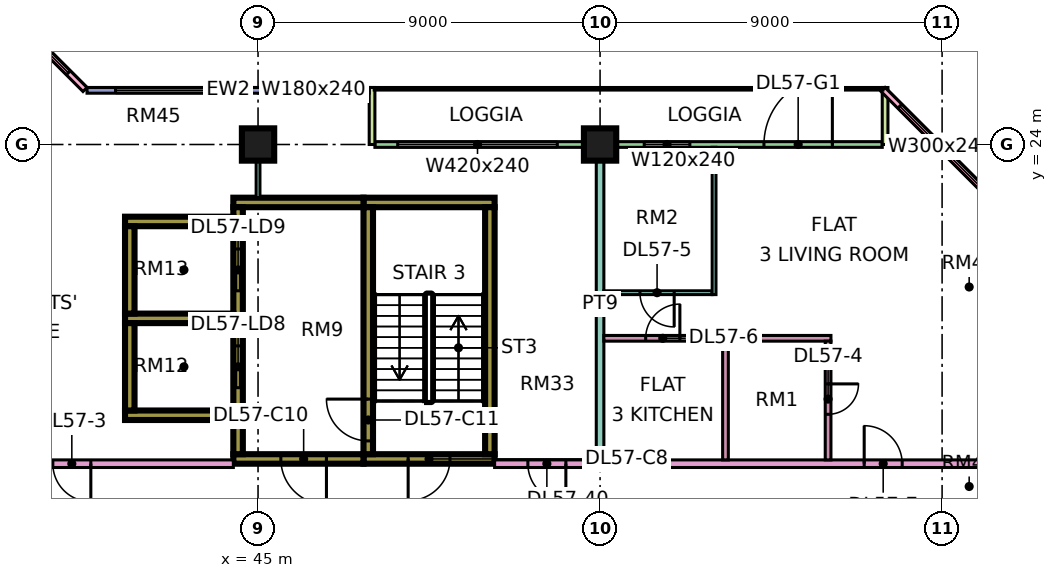
"""IFC4 building model, lengths in metres.
Left out: names, types, materials, properties, quantities, classifications, styles, units other than length and angle.
Written with IfcOpenShell. Run it as: python <this file> out.ifc"""

import sys

from ifc_helpers import new_model, si_unit, direction, frame, frame_2d, origin, origin_2d, place, context, subcontext, project, spatial, rectangle, extrude, element, fill, save


model = new_model("IFC4")
c1 = context("Model", 3, precision=1e-05, world=origin(), true_north=direction((0.0, 1.0)))
c2 = subcontext(c1, "Body", "Model", "MODEL_VIEW")
j1 = project(units=[si_unit("LENGTHUNIT", "METRE"), si_unit("PLANEANGLEUNIT", "RADIAN")], contexts=[c1])
p1 = place(None, origin())
s1 = spatial("IfcSite", under=j1, at=p1, CompositionType="ELEMENT")
p2 = place(p1, origin())
s2 = spatial("IfcBuilding", under=s1, at=p2, CompositionType="ELEMENT")
p3 = place(p2, frame((0.0, 0.0, 241.65)))
s3 = spatial("IfcBuildingStorey", under=s2, at=p3, CompositionType="ELEMENT", Elevation=241.65)
for number, where, z_axis, x_axis in (
    (1, (45.0, 24.0, 0.0), (0.0, 0.0, 1.0), (1.0, 0.0, 0.0)),
    (2, (54.0, 24.0, 0.0), (0.0, 0.0, 1.0), (1.0, 0.0, 0.0)),
):
    element("IfcColumn", number, at=place(p3, frame(where, z_axis=z_axis, x_axis=x_axis)), inside=s3, PredefinedType="COLUMN", context=c2, shape_type="SweptSolid", body=[
        extrude(rectangle(XDim=0.85, YDim=0.85, at=origin_2d()), origin(), (0.0, 0.0, 1.0), 3.75),
    ])
p4 = place(p3, frame((47.775, 15.725, 0.0), z_axis=(0.0, 0.0, 1.0), x_axis=(1.0, 0.0, 0.0)))
e3 = element("IfcWall", 3, at=p4, inside=s3, PredefinedType="SHEAR", context=c2, shape_type="SweptSolid", body=[
    extrude(rectangle(XDim=3.45, YDim=0.25, at=frame_2d((1.725, 0.0))), origin(), (0.0, 0.0, 1.0), 3.75),
])
p5 = place(p4, frame((1.175, 0.0, 0.0)))
e4 = element("IfcOpeningElement", 4, at=p5, cuts=e3, PredefinedType="OPENING", context=c2, shape_type="SweptSolid", body=[
    extrude(rectangle(XDim=1.1, YDim=2.2, at=frame_2d((0.55, 1.1))), frame((0.0, 0.135, 0.0), z_axis=(0.0, -1.0, 0.0), x_axis=(1.0, 0.0, 0.0)), (0.0, 0.0, 1.0), 0.27),
])
p6 = place(p3, frame((47.775, 22.475, 0.0), z_axis=(0.0, 0.0, 1.0), x_axis=(1.0, 0.0, 0.0)))
e5 = element("IfcWall", 5, at=p6, inside=s3, PredefinedType="SHEAR", context=c2, shape_type="SweptSolid", body=[
    extrude(rectangle(XDim=3.45, YDim=0.25, at=frame_2d((1.725, 0.0))), origin(), (0.0, 0.0, 1.0), 3.75),
])
p7 = place(p3, frame((47.9, 15.85, 0.0), z_axis=(0.0, 0.0, 1.0), x_axis=(0.0, 1.0, 0.0)))
e6 = element("IfcWall", 6, at=p7, inside=s3, PredefinedType="SHEAR", context=c2, shape_type="SweptSolid", body=[
    extrude(rectangle(XDim=6.5, YDim=0.25, at=frame_2d((3.25, 0.0))), origin(), (0.0, 0.0, 1.0), 3.75),
])
p8 = place(p7, frame((0.35, 0.0, 0.0)))
e7 = element("IfcOpeningElement", 7, at=p8, cuts=e6, PredefinedType="OPENING", context=c2, shape_type="SweptSolid", body=[
    extrude(rectangle(XDim=1.1, YDim=2.2, at=frame_2d((0.55, 1.1))), frame((0.0, 0.135, 0.0), z_axis=(0.0, -1.0, 0.0), x_axis=(1.0, 0.0, 0.0)), (0.0, 0.0, 1.0), 0.27),
])
p9 = place(p3, frame((51.1, 15.85, 0.0), z_axis=(0.0, 0.0, 1.0), x_axis=(0.0, 1.0, 0.0)))
e8 = element("IfcWall", 8, at=p9, inside=s3, PredefinedType="SHEAR", context=c2, shape_type="SweptSolid", body=[
    extrude(rectangle(XDim=6.5, YDim=0.25, at=frame_2d((3.25, 0.0))), origin(), (0.0, 0.0, 1.0), 3.75),
])
p10 = place(p3, frame((44.35, 15.725, 0.0), z_axis=(0.0, 0.0, 1.0), x_axis=(1.0, 0.0, 0.0)))
e9 = element("IfcWall", 9, at=p10, inside=s3, PredefinedType="SHEAR", context=c2, shape_type="SweptSolid", body=[
    extrude(rectangle(XDim=3.425, YDim=0.25, at=frame_2d((1.712, 0.0))), origin(), (0.0, 0.0, 1.0), 3.75),
])
p11 = place(p10, frame((1.25, 0.0, 0.0)))
e10 = element("IfcOpeningElement", 10, at=p11, cuts=e9, PredefinedType="OPENING", context=c2, shape_type="SweptSolid", body=[
    extrude(rectangle(XDim=1.2, YDim=2.2, at=frame_2d((0.6, 1.1))), frame((0.0, 0.135, 0.0), z_axis=(0.0, -1.0, 0.0), x_axis=(1.0, 0.0, 0.0)), (0.0, 0.0, 1.0), 0.27),
])
p12 = place(p3, frame((44.35, 22.475, 0.0), z_axis=(0.0, 0.0, 1.0), x_axis=(1.0, 0.0, 0.0)))
e11 = element("IfcWall", 11, at=p12, inside=s3, PredefinedType="SHEAR", context=c2, shape_type="SweptSolid", body=[
    extrude(rectangle(XDim=3.425, YDim=0.25, at=frame_2d((1.712, 0.0))), origin(), (0.0, 0.0, 1.0), 3.75),
])
p13 = place(p3, frame((44.475, 15.85, 0.0), z_axis=(0.0, 0.0, 1.0), x_axis=(0.0, 1.0, 0.0)))
e12 = element("IfcWall", 12, at=p13, inside=s3, PredefinedType="SHEAR", context=c2, shape_type="SweptSolid", body=[
    extrude(rectangle(XDim=6.5, YDim=0.25, at=frame_2d((3.25, 0.0))), origin(), (0.0, 0.0, 1.0), 3.75),
])
p14 = place(p13, frame((1.75, 0.0, 0.0)))
e13 = element("IfcOpeningElement", 13, at=p14, cuts=e12, PredefinedType="OPENING", context=c2, shape_type="SweptSolid", body=[
    extrude(rectangle(XDim=1.1, YDim=2.2, at=frame_2d((0.55, 1.1))), frame((0.0, 0.135, 0.0), z_axis=(0.0, -1.0, 0.0), x_axis=(1.0, 0.0, 0.0)), (0.0, 0.0, 1.0), 0.27),
])
p15 = place(p13, frame((4.3, 0.0, 0.0)))
e14 = element("IfcOpeningElement", 14, at=p15, cuts=e12, PredefinedType="OPENING", context=c2, shape_type="SweptSolid", body=[
    extrude(rectangle(XDim=1.1, YDim=2.2, at=frame_2d((0.55, 1.1))), frame((0.0, 0.135, 0.0), z_axis=(0.0, -1.0, 0.0), x_axis=(1.0, 0.0, 0.0)), (0.0, 0.0, 1.0), 0.27),
])
for number, where, z_axis, x_axis in (
    (15, (41.5, 16.875, 0.0), (0.0, 0.0, 1.0), (1.0, 0.0, 0.0)),
    (16, (41.5, 19.425, 0.0), (0.0, 0.0, 1.0), (1.0, 0.0, 0.0)),
    (17, (41.5, 21.975, 0.0), (0.0, 0.0, 1.0), (1.0, 0.0, 0.0)),
):
    element("IfcWall", number, at=place(p3, frame(where, z_axis=z_axis, x_axis=x_axis)), inside=s3, PredefinedType="SHEAR", context=c2, shape_type="SweptSolid", body=[
        extrude(rectangle(XDim=2.85, YDim=0.25, at=frame_2d((1.425, 0.0))), origin(), (0.0, 0.0, 1.0), 3.75),
    ])
for number, where, z_axis, x_axis in (
    (18, (41.625, 17.0, 0.0), (0.0, 0.0, 1.0), (0.0, 1.0, 0.0)),
    (19, (41.625, 19.55, 0.0), (0.0, 0.0, 1.0), (0.0, 1.0, 0.0)),
):
    element("IfcWall", number, at=place(p3, frame(where, z_axis=z_axis, x_axis=x_axis)), inside=s3, PredefinedType="SHEAR", context=c2, shape_type="SweptSolid", body=[
        extrude(rectangle(XDim=2.3, YDim=0.25, at=frame_2d((1.15, 0.0))), origin(), (0.0, 0.0, 1.0), 3.75),
    ])
p16 = place(p3, frame((61.425, 24.0, 0.0), z_axis=(0.0, 0.0, 1.0), x_axis=(-1.0, 0.0, 0.0)))
e20 = element("IfcWall", 20, at=p16, inside=s3, PredefinedType="SOLIDWALL", context=c2, shape_type="SweptSolid", body=[
    extrude(rectangle(XDim=13.35, YDim=0.15, at=frame_2d((6.675, 0.0))), origin(), (0.0, 0.0, 1.0), 3.35),
])
p17 = place(p16, frame((1.312, 0.0, 0.0)))
e21 = element("IfcOpeningElement", 21, at=p17, cuts=e20, PredefinedType="OPENING", context=c2, shape_type="SweptSolid", body=[
    extrude(rectangle(XDim=1.8, YDim=2.4, at=frame_2d((0.9, 1.2))), frame((0.0, 0.085, 0.0), z_axis=(0.0, -1.0, 0.0), x_axis=(1.0, 0.0, 0.0)), (0.0, 0.0, 1.0), 0.17),
])
p18 = place(p16, frame((5.062, 0.0, 0.45)))
e22 = element("IfcOpeningElement", 22, at=p18, cuts=e20, PredefinedType="OPENING", context=c2, shape_type="SweptSolid", body=[
    extrude(rectangle(XDim=1.2, YDim=2.4, at=frame_2d((0.6, 1.2))), frame((0.0, 0.085, 0.0), z_axis=(0.0, -1.0, 0.0), x_axis=(1.0, 0.0, 0.0)), (0.0, 0.0, 1.0), 0.17),
])
p19 = place(p16, frame((8.55, 0.0, 0.45)))
e23 = element("IfcOpeningElement", 23, at=p19, cuts=e20, PredefinedType="OPENING", context=c2, shape_type="SweptSolid", body=[
    extrude(rectangle(XDim=4.2, YDim=2.4, at=frame_2d((2.1, 1.2))), frame((0.0, 0.085, 0.0), z_axis=(0.0, -1.0, 0.0), x_axis=(1.0, 0.0, 0.0)), (0.0, 0.0, 1.0), 0.17),
])
for number, where, z_axis, x_axis in (
    (24, (61.5, 25.5, 0.0), (0.0, 0.0, 1.0), (0.0, -1.0, 0.0)),
    (25, (48.0, 25.5, 0.0), (0.0, 0.0, 1.0), (0.0, -1.0, 0.0)),
):
    element("IfcWall", number, at=place(p3, frame(where, z_axis=z_axis, x_axis=x_axis)), inside=s3, PredefinedType="SOLIDWALL", context=c2, shape_type="SweptSolid", body=[
        extrude(rectangle(XDim=1.5, YDim=0.15, at=frame_2d((0.75, 0.0))), origin(), (0.0, 0.0, 1.0), 3.35),
    ])
p20 = place(p3, frame((47.925, 25.425, 0.0), z_axis=(0.0, 0.0, 1.0), x_axis=(-1.0, 0.0, 0.0)))
e26 = element("IfcWall", 26, at=p20, inside=s3, PredefinedType="SOLIDWALL", context=c2, shape_type="SweptSolid", body=[
    extrude(rectangle(XDim=7.425, YDim=0.15, at=frame_2d((3.712, 0.0))), origin(), (0.0, 0.0, 1.0), 3.35),
])
p21 = place(p20, frame((0.562, 0.0, 0.45)))
e27 = element("IfcOpeningElement", 27, at=p21, cuts=e26, PredefinedType="OPENING", context=c2, shape_type="SweptSolid", body=[
    extrude(rectangle(XDim=1.8, YDim=2.4, at=frame_2d((0.9, 1.2))), frame((0.0, 0.085, 0.0), z_axis=(0.0, -1.0, 0.0), x_axis=(1.0, 0.0, 0.0)), (0.0, 0.0, 1.0), 0.17),
])
p22 = place(p20, frame((3.675, 0.0, 0.45)))
e28 = element("IfcOpeningElement", 28, at=p22, cuts=e26, PredefinedType="OPENING", context=c2, shape_type="SweptSolid", body=[
    extrude(rectangle(XDim=3.0, YDim=2.4, at=frame_2d((1.5, 1.2))), frame((0.0, 0.085, 0.0), z_axis=(0.0, -1.0, 0.0), x_axis=(1.0, 0.0, 0.0)), (0.0, 0.0, 1.0), 0.17),
])
p23 = place(p3, frame((40.447, 25.447, 0.0), z_axis=(0.0, 0.0, 1.0), x_axis=(-0.707106781187, 0.707106781187, 0.0)))
e29 = element("IfcWall", 29, at=p23, inside=s3, PredefinedType="SOLIDWALL", context=c2, shape_type="SweptSolid", body=[
    extrude(rectangle(XDim=4.243, YDim=0.15, at=frame_2d((2.121, 0.0))), origin(), (0.0, 0.0, 1.0), 3.35),
])
p24 = place(p23, frame((0.621, 0.0, 0.45)))
e30 = element("IfcOpeningElement", 30, at=p24, cuts=e29, PredefinedType="OPENING", context=c2, shape_type="SweptSolid", body=[
    extrude(rectangle(XDim=3.0, YDim=2.4, at=frame_2d((1.5, 1.2))), frame((0.0, 0.085, 0.0), z_axis=(0.0, -1.0, 0.0), x_axis=(1.0, 0.0, 0.0)), (0.0, 0.0, 1.0), 0.17),
])
p25 = place(p3, frame((64.447, 22.447, 0.0), z_axis=(0.0, 0.0, 1.0), x_axis=(-0.707106781187, 0.707106781187, 0.0)))
e31 = element("IfcWall", 31, at=p25, inside=s3, PredefinedType="SOLIDWALL", context=c2, shape_type="SweptSolid", body=[
    extrude(rectangle(XDim=4.243, YDim=0.15, at=frame_2d((2.121, 0.0))), origin(), (0.0, 0.0, 1.0), 3.35),
])
p26 = place(p25, frame((0.621, 0.0, 0.45)))
e32 = element("IfcOpeningElement", 32, at=p26, cuts=e31, PredefinedType="OPENING", context=c2, shape_type="SweptSolid", body=[
    extrude(rectangle(XDim=3.0, YDim=2.4, at=frame_2d((1.5, 1.2))), frame((0.0, 0.085, 0.0), z_axis=(0.0, -1.0, 0.0), x_axis=(1.0, 0.0, 0.0)), (0.0, 0.0, 1.0), 0.17),
])
p27 = place(p3, frame((34.0, 15.6, 0.0), z_axis=(0.0, 0.0, 1.0), x_axis=(1.0, 0.0, 0.0)))
e33 = element("IfcWall", 33, at=p27, inside=s3, PredefinedType="PARTITIONING", context=c2, shape_type="SweptSolid", body=[
    extrude(rectangle(XDim=10.35, YDim=0.2, at=frame_2d((5.175, 0.0))), origin(), (0.0, 0.0, 1.0), 3.35),
])
p28 = place(p27, frame((5.6, 0.0, 0.0)))
e34 = element("IfcOpeningElement", 34, at=p28, cuts=e33, PredefinedType="OPENING", context=c2, shape_type="SweptSolid", body=[
    extrude(rectangle(XDim=1.0, YDim=2.1, at=frame_2d((0.5, 1.05))), frame((0.0, 0.11, 0.0), z_axis=(0.0, -1.0, 0.0), x_axis=(1.0, 0.0, 0.0)), (0.0, 0.0, 1.0), 0.22),
])
p29 = place(p27, frame((0.45, 0.0, 0.0)))
e35 = element("IfcOpeningElement", 35, at=p29, cuts=e33, PredefinedType="OPENING", context=c2, shape_type="SweptSolid", body=[
    extrude(rectangle(XDim=1.2, YDim=2.1, at=frame_2d((0.6, 1.05))), frame((0.0, 0.11, 0.0), z_axis=(0.0, -1.0, 0.0), x_axis=(1.0, 0.0, 0.0)), (0.0, 0.0, 1.0), 0.22),
])
p30 = place(p3, frame((45.0, 22.6, 0.0), z_axis=(0.0, 0.0, 1.0), x_axis=(0.0, 1.0, 0.0)))
e36 = element("IfcWall", 36, at=p30, inside=s3, PredefinedType="PARTITIONING", context=c2, shape_type="SweptSolid", body=[
    extrude(rectangle(XDim=1.4, YDim=0.1, at=frame_2d((0.7, 0.0))), origin(), (0.0, 0.0, 1.0), 3.35),
])
p31 = place(p3, frame((51.225, 15.6, 0.0), z_axis=(0.0, 0.0, 1.0), x_axis=(1.0, 0.0, 0.0)))
e37 = element("IfcWall", 37, at=p31, inside=s3, PredefinedType="PARTITIONING", context=c2, shape_type="SweptSolid", body=[
    extrude(rectangle(XDim=13.125, YDim=0.2, at=frame_2d((6.562, 0.0))), origin(), (0.0, 0.0, 1.0), 3.35),
])
p32 = place(p31, frame((9.725, 0.0, 0.0)))
e38 = element("IfcOpeningElement", 38, at=p32, cuts=e37, PredefinedType="OPENING", context=c2, shape_type="SweptSolid", body=[
    extrude(rectangle(XDim=1.0, YDim=2.1, at=frame_2d((0.5, 1.05))), frame((0.0, 0.11, 0.0), z_axis=(0.0, -1.0, 0.0), x_axis=(1.0, 0.0, 0.0)), (0.0, 0.0, 1.0), 0.22),
])
p33 = place(p31, frame((0.875, 0.0, 0.0)))
e39 = element("IfcOpeningElement", 39, at=p33, cuts=e37, PredefinedType="OPENING", context=c2, shape_type="SweptSolid", body=[
    extrude(rectangle(XDim=1.0, YDim=2.1, at=frame_2d((0.5, 1.05))), frame((0.0, 0.11, 0.0), z_axis=(0.0, -1.0, 0.0), x_axis=(1.0, 0.0, 0.0)), (0.0, 0.0, 1.0), 0.22),
])
p34 = place(p3, frame((54.0, 15.7, 0.0), z_axis=(0.0, 0.0, 1.0), x_axis=(0.0, 1.0, 0.0)))
e40 = element("IfcWall", 40, at=p34, inside=s3, PredefinedType="PARTITIONING", context=c2, shape_type="SweptSolid", body=[
    extrude(rectangle(XDim=8.226, YDim=0.2, at=frame_2d((4.113, 0.0))), origin(), (0.0, 0.0, 1.0), 3.35),
])
p35 = place(p3, frame((54.1, 18.9, 0.0), z_axis=(0.0, 0.0, 1.0), x_axis=(1.0, 0.0, 0.0)))
e41 = element("IfcWall", 41, at=p35, inside=s3, PredefinedType="PARTITIONING", context=c2, shape_type="SweptSolid", body=[
    extrude(rectangle(XDim=5.975, YDim=0.15, at=frame_2d((2.987, 0.0))), origin(), (0.0, 0.0, 1.0), 3.35),
])
p36 = place(p35, frame((1.1, 0.0, 0.0)))
e42 = element("IfcOpeningElement", 42, at=p36, cuts=e41, PredefinedType="OPENING", context=c2, shape_type="SweptSolid", body=[
    extrude(rectangle(XDim=0.9, YDim=2.1, at=frame_2d((0.45, 1.05))), frame((0.0, 0.085, 0.0), z_axis=(0.0, -1.0, 0.0), x_axis=(1.0, 0.0, 0.0)), (0.0, 0.0, 1.0), 0.17),
])
p37 = place(p3, frame((54.1, 20.1, 0.0), z_axis=(0.0, 0.0, 1.0), x_axis=(1.0, 0.0, 0.0)))
e43 = element("IfcWall", 43, at=p37, inside=s3, PredefinedType="PARTITIONING", context=c2, shape_type="SweptSolid", body=[
    extrude(rectangle(XDim=2.85, YDim=0.1, at=frame_2d((1.425, 0.0))), origin(), (0.0, 0.0, 1.0), 3.35),
])
p38 = place(p37, frame((0.95, 0.0, 0.0)))
e44 = element("IfcOpeningElement", 44, at=p38, cuts=e43, PredefinedType="OPENING", context=c2, shape_type="SweptSolid", body=[
    extrude(rectangle(XDim=0.9, YDim=2.1, at=frame_2d((0.45, 1.05))), frame((0.0, 0.06, 0.0), z_axis=(0.0, -1.0, 0.0), x_axis=(1.0, 0.0, 0.0)), (0.0, 0.0, 1.0), 0.12),
])
p39 = place(p3, frame((57.0, 20.05, 0.0), z_axis=(0.0, 0.0, 1.0), x_axis=(0.0, 1.0, 0.0)))
e45 = element("IfcWall", 45, at=p39, inside=s3, PredefinedType="PARTITIONING", context=c2, shape_type="SweptSolid", body=[
    extrude(rectangle(XDim=3.876, YDim=0.1, at=frame_2d((1.938, 0.0))), origin(), (0.0, 0.0, 1.0), 3.35),
])
p40 = place(p3, frame((57.3, 15.7, 0.0), z_axis=(0.0, 0.0, 1.0), x_axis=(0.0, 1.0, 0.0)))
e46 = element("IfcWall", 46, at=p40, inside=s3, PredefinedType="PARTITIONING", context=c2, shape_type="SweptSolid", body=[
    extrude(rectangle(XDim=3.125, YDim=0.15, at=frame_2d((1.562, 0.0))), origin(), (0.0, 0.0, 1.0), 3.35),
])
p41 = place(p3, frame((60.0, 15.7, 0.0), z_axis=(0.0, 0.0, 1.0), x_axis=(0.0, 1.0, 0.0)))
e47 = element("IfcWall", 47, at=p41, inside=s3, PredefinedType="PARTITIONING", context=c2, shape_type="SweptSolid", body=[
    extrude(rectangle(XDim=3.125, YDim=0.15, at=frame_2d((1.562, 0.0))), origin(), (0.0, 0.0, 1.0), 3.35),
])
p42 = place(p41, frame((1.2, 0.0, 0.0)))
e48 = element("IfcOpeningElement", 48, at=p42, cuts=e47, PredefinedType="OPENING", context=c2, shape_type="SweptSolid", body=[
    extrude(rectangle(XDim=0.8, YDim=2.1, at=frame_2d((0.4, 1.05))), frame((0.0, 0.085, 0.0), z_axis=(0.0, -1.0, 0.0), x_axis=(1.0, 0.0, 0.0)), (0.0, 0.0, 1.0), 0.17),
])
p43 = place(p17, frame((1.8, 0.0, 0.0), z_axis=(0.0, 0.0, 1.0), x_axis=(-1.0, 0.0, 0.0)))
e49 = element("IfcDoor", 49, at=p43, inside=s3, OperationType="DOUBLE_DOOR_SINGLE_SWING", PredefinedType="DOOR", context=c2, shape_type="SweptSolid", body=[
    extrude(rectangle(XDim=1.8, YDim=2.4, at=frame_2d((0.9, 1.2))), frame((0.0, 0.025, 0.0), z_axis=(0.0, -1.0, 0.0), x_axis=(1.0, 0.0, 0.0)), (0.0, 0.0, 1.0), 0.05),
])
fill(e21, e49)
p44 = place(p18, origin())
e50 = element("IfcWindow", 50, at=p44, inside=s3, PartitioningType="SINGLE_PANEL", PredefinedType="WINDOW", context=c2, shape_type="SweptSolid", body=[
    extrude(rectangle(XDim=1.2, YDim=2.4, at=frame_2d((0.6, 1.2))), frame((0.0, 0.03, 0.0), z_axis=(0.0, -1.0, 0.0), x_axis=(1.0, 0.0, 0.0)), (0.0, 0.0, 1.0), 0.06),
])
fill(e22, e50)
p45 = place(p19, origin())
e51 = element("IfcWindow", 51, at=p45, inside=s3, PartitioningType="SINGLE_PANEL", PredefinedType="WINDOW", context=c2, shape_type="SweptSolid", body=[
    extrude(rectangle(XDim=4.2, YDim=2.4, at=frame_2d((2.1, 1.2))), frame((0.0, 0.03, 0.0), z_axis=(0.0, -1.0, 0.0), x_axis=(1.0, 0.0, 0.0)), (0.0, 0.0, 1.0), 0.06),
])
fill(e23, e51)
p46 = place(p21, origin())
e52 = element("IfcWindow", 52, at=p46, inside=s3, PartitioningType="SINGLE_PANEL", PredefinedType="WINDOW", context=c2, shape_type="SweptSolid", body=[
    extrude(rectangle(XDim=1.8, YDim=2.4, at=frame_2d((0.9, 1.2))), frame((0.0, 0.03, 0.0), z_axis=(0.0, -1.0, 0.0), x_axis=(1.0, 0.0, 0.0)), (0.0, 0.0, 1.0), 0.06),
])
fill(e27, e52)
p47 = place(p22, origin())
e53 = element("IfcWindow", 53, at=p47, inside=s3, PartitioningType="SINGLE_PANEL", PredefinedType="WINDOW", context=c2, shape_type="SweptSolid", body=[
    extrude(rectangle(XDim=3.0, YDim=2.4, at=frame_2d((1.5, 1.2))), frame((0.0, 0.03, 0.0), z_axis=(0.0, -1.0, 0.0), x_axis=(1.0, 0.0, 0.0)), (0.0, 0.0, 1.0), 0.06),
])
fill(e28, e53)
p48 = place(p24, origin())
e54 = element("IfcWindow", 54, at=p48, inside=s3, PartitioningType="SINGLE_PANEL", PredefinedType="WINDOW", context=c2, shape_type="SweptSolid", body=[
    extrude(rectangle(XDim=3.0, YDim=2.4, at=frame_2d((1.5, 1.2))), frame((0.0, 0.03, 0.0), z_axis=(0.0, -1.0, 0.0), x_axis=(1.0, 0.0, 0.0)), (0.0, 0.0, 1.0), 0.06),
])
fill(e30, e54)
p49 = place(p26, origin())
e55 = element("IfcWindow", 55, at=p49, inside=s3, PartitioningType="SINGLE_PANEL", PredefinedType="WINDOW", context=c2, shape_type="SweptSolid", body=[
    extrude(rectangle(XDim=3.0, YDim=2.4, at=frame_2d((1.5, 1.2))), frame((0.0, 0.03, 0.0), z_axis=(0.0, -1.0, 0.0), x_axis=(1.0, 0.0, 0.0)), (0.0, 0.0, 1.0), 0.06),
])
fill(e32, e55)
p50 = place(p5, frame((1.1, 0.0, 0.0), z_axis=(0.0, 0.0, 1.0), x_axis=(-1.0, 0.0, 0.0)))
e56 = element("IfcDoor", 56, at=p50, inside=s3, OperationType="SINGLE_SWING_LEFT", PredefinedType="DOOR", context=c2, shape_type="SweptSolid", body=[
    extrude(rectangle(XDim=1.1, YDim=2.2, at=frame_2d((0.55, 1.1))), frame((0.0, 0.025, 0.0), z_axis=(0.0, -1.0, 0.0), x_axis=(1.0, 0.0, 0.0)), (0.0, 0.0, 1.0), 0.05),
])
fill(e4, e56)
p51 = place(p11, origin())
e57 = element("IfcDoor", 57, at=p51, inside=s3, OperationType="SINGLE_SWING_RIGHT", PredefinedType="DOOR", context=c2, shape_type="SweptSolid", body=[
    extrude(rectangle(XDim=1.2, YDim=2.2, at=frame_2d((0.6, 1.1))), frame((0.0, 0.025, 0.0), z_axis=(0.0, -1.0, 0.0), x_axis=(1.0, 0.0, 0.0)), (0.0, 0.0, 1.0), 0.05),
])
fill(e10, e57)
p52 = place(p8, frame((1.1, 0.0, 0.0), z_axis=(0.0, 0.0, 1.0), x_axis=(-1.0, 0.0, 0.0)))
e58 = element("IfcDoor", 58, at=p52, inside=s3, OperationType="SINGLE_SWING_RIGHT", PredefinedType="DOOR", context=c2, shape_type="SweptSolid", body=[
    extrude(rectangle(XDim=1.1, YDim=2.2, at=frame_2d((0.55, 1.1))), frame((0.0, 0.025, 0.0), z_axis=(0.0, -1.0, 0.0), x_axis=(1.0, 0.0, 0.0)), (0.0, 0.0, 1.0), 0.05),
])
fill(e7, e58)
p53 = place(p14, origin())
e59 = element("IfcDoor", 59, at=p53, inside=s3, OperationType="DOUBLE_DOOR_SLIDING", PredefinedType="DOOR", context=c2, shape_type="SweptSolid", body=[
    extrude(rectangle(XDim=1.1, YDim=2.2, at=frame_2d((0.55, 1.1))), frame((0.0, 0.025, 0.0), z_axis=(0.0, -1.0, 0.0), x_axis=(1.0, 0.0, 0.0)), (0.0, 0.0, 1.0), 0.05),
])
fill(e13, e59)
p54 = place(p15, origin())
e60 = element("IfcDoor", 60, at=p54, inside=s3, OperationType="DOUBLE_DOOR_SLIDING", PredefinedType="DOOR", context=c2, shape_type="SweptSolid", body=[
    extrude(rectangle(XDim=1.1, YDim=2.2, at=frame_2d((0.55, 1.1))), frame((0.0, 0.025, 0.0), z_axis=(0.0, -1.0, 0.0), x_axis=(1.0, 0.0, 0.0)), (0.0, 0.0, 1.0), 0.05),
])
fill(e14, e60)
p55 = place(p28, origin())
e61 = element("IfcDoor", 61, at=p55, inside=s3, OperationType="SINGLE_SWING_RIGHT", PredefinedType="DOOR", context=c2, shape_type="SweptSolid", body=[
    extrude(rectangle(XDim=1.0, YDim=2.1, at=frame_2d((0.5, 1.05))), frame((0.0, 0.025, 0.0), z_axis=(0.0, -1.0, 0.0), x_axis=(1.0, 0.0, 0.0)), (0.0, 0.0, 1.0), 0.05),
])
fill(e34, e61)
p56 = place(p42, origin())
e62 = element("IfcDoor", 62, at=p56, inside=s3, OperationType="SINGLE_SWING_RIGHT", PredefinedType="DOOR", context=c2, shape_type="SweptSolid", body=[
    extrude(rectangle(XDim=0.8, YDim=2.1, at=frame_2d((0.4, 1.05))), frame((0.0, 0.025, 0.0), z_axis=(0.0, -1.0, 0.0), x_axis=(1.0, 0.0, 0.0)), (0.0, 0.0, 1.0), 0.05),
])
fill(e48, e62)
p57 = place(p38, origin())
e63 = element("IfcDoor", 63, at=p57, inside=s3, OperationType="SINGLE_SWING_RIGHT", PredefinedType="DOOR", context=c2, shape_type="SweptSolid", body=[
    extrude(rectangle(XDim=0.9, YDim=2.1, at=frame_2d((0.45, 1.05))), frame((0.0, 0.025, 0.0), z_axis=(0.0, -1.0, 0.0), x_axis=(1.0, 0.0, 0.0)), (0.0, 0.0, 1.0), 0.05),
])
fill(e44, e63)
p58 = place(p36, frame((0.9, 0.0, 0.0), z_axis=(0.0, 0.0, 1.0), x_axis=(-1.0, 0.0, 0.0)))
e64 = element("IfcDoor", 64, at=p58, inside=s3, OperationType="SINGLE_SWING_RIGHT", PredefinedType="DOOR", context=c2, shape_type="SweptSolid", body=[
    extrude(rectangle(XDim=0.9, YDim=2.1, at=frame_2d((0.45, 1.05))), frame((0.0, 0.025, 0.0), z_axis=(0.0, -1.0, 0.0), x_axis=(1.0, 0.0, 0.0)), (0.0, 0.0, 1.0), 0.05),
])
fill(e42, e64)
p59 = place(p32, origin())
e65 = element("IfcDoor", 65, at=p59, inside=s3, OperationType="SINGLE_SWING_LEFT", PredefinedType="DOOR", context=c2, shape_type="SweptSolid", body=[
    extrude(rectangle(XDim=1.0, YDim=2.1, at=frame_2d((0.5, 1.05))), frame((0.0, 0.025, 0.0), z_axis=(0.0, -1.0, 0.0), x_axis=(1.0, 0.0, 0.0)), (0.0, 0.0, 1.0), 0.05),
])
fill(e38, e65)
p60 = place(p33, origin())
e66 = element("IfcDoor", 66, at=p60, inside=s3, OperationType="SINGLE_SWING_RIGHT", PredefinedType="DOOR", context=c2, shape_type="SweptSolid", body=[
    extrude(rectangle(XDim=1.0, YDim=2.1, at=frame_2d((0.5, 1.05))), frame((0.0, 0.025, 0.0), z_axis=(0.0, -1.0, 0.0), x_axis=(1.0, 0.0, 0.0)), (0.0, 0.0, 1.0), 0.05),
])
fill(e39, e66)
save(model, sys.argv[1])
